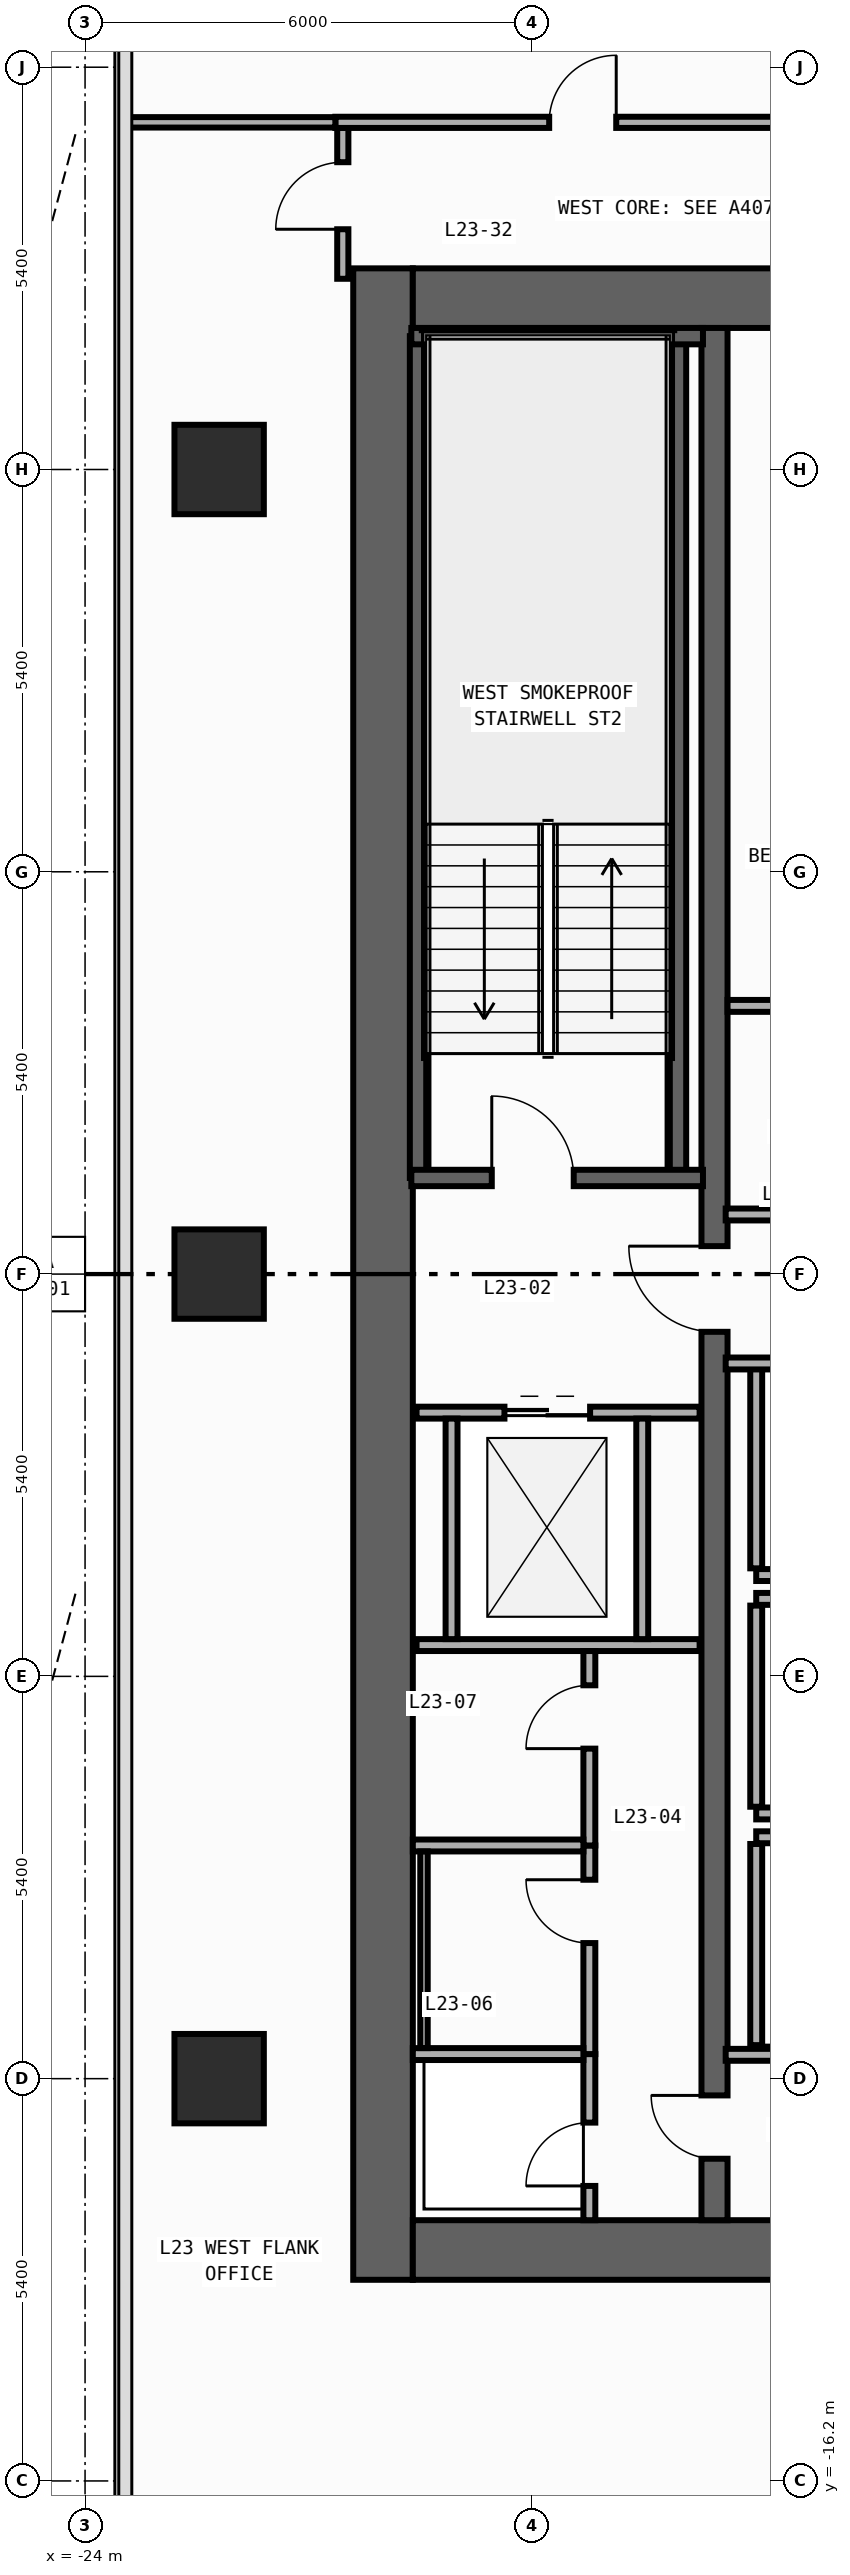
"""IFC4 building model, lengths in metres.
Left out: names, types, materials, properties, quantities, classifications, styles, units other than length and angle.
Written with IfcOpenShell. Run it as: python <this file> out.ifc"""

import sys

from ifc_helpers import new_model, si_unit, direction, frame, frame_2d, origin, origin_2d, place, context, subcontext, project, spatial, rectangle, extrude, element, fill, save


model = new_model("IFC4")
c1 = context("Model", 3, precision=1e-05, world=origin(), true_north=direction((0.0, 1.0)))
c2 = subcontext(c1, "Body", "Model", "MODEL_VIEW")
j1 = project(units=[si_unit("LENGTHUNIT", "METRE"), si_unit("PLANEANGLEUNIT", "RADIAN")], contexts=[c1])
p1 = place(None, origin())
s1 = spatial("IfcSite", under=j1, at=p1, CompositionType="ELEMENT")
p2 = place(p1, origin())
s2 = spatial("IfcBuilding", under=s1, at=p2, CompositionType="ELEMENT")
p3 = place(p2, frame((0.0, 0.0, 101.6)))
s3 = spatial("IfcBuildingStorey", under=s2, at=p3, CompositionType="ELEMENT", Elevation=101.6)
p4 = place(p3, frame((-20.0, -13.5, 0.0), z_axis=(0.0, 0.0, 1.0), x_axis=(0.0, 1.0, 0.0)))
e1 = element("IfcWall", 1, at=p4, inside=s3, PredefinedType="SHEAR", context=c2, shape_type="SweptSolid", body=[
    extrude(rectangle(XDim=27.0, YDim=0.8, at=frame_2d((13.5, 0.0))), origin(), (0.0, 0.0, 1.0), 3.94),
])
for number, where, z_axis, x_axis in (
    (2, (-19.6, -13.1, 0.0), (0.0, 0.0, 1.0), (1.0, 0.0, 0.0)),
    (3, (-19.6, 13.1, 0.0), (0.0, 0.0, 1.0), (1.0, 0.0, 0.0)),
):
    element("IfcWall", number, at=place(p3, frame(where, z_axis=z_axis, x_axis=x_axis)), inside=s3, PredefinedType="SHEAR", context=c2, shape_type="SweptSolid", body=[
        extrude(rectangle(XDim=6.8, YDim=0.8, at=frame_2d((3.4, 0.0))), origin(), (0.0, 0.0, 1.0), 3.94),
    ])
p5 = place(p3, frame((-15.55, -12.7, 0.0), z_axis=(0.0, 0.0, 1.0), x_axis=(0.0, 1.0, 0.0)))
e4 = element("IfcWall", 4, at=p5, inside=s3, PredefinedType="SHEAR", context=c2, shape_type="SweptSolid", body=[
    extrude(rectangle(XDim=25.4, YDim=0.35, at=frame_2d((12.7, 0.0))), origin(), (0.0, 0.0, 1.0), 3.94),
])
p6 = place(p5, frame((11.925, 0.0, 0.0)))
e5 = element("IfcOpeningElement", 5, at=p6, cuts=e4, PredefinedType="OPENING", context=c2, shape_type="SweptSolid", body=[
    extrude(rectangle(XDim=1.15, YDim=2.2, at=frame_2d((0.575, 1.1))), frame((0.0, 0.185, 0.0), z_axis=(0.0, -1.0, 0.0), x_axis=(1.0, 0.0, 0.0)), (0.0, 0.0, 1.0), 0.37),
])
p7 = place(p5, frame((0.825, 0.0, 0.0)))
e6 = element("IfcOpeningElement", 6, at=p7, cuts=e4, PredefinedType="OPENING", context=c2, shape_type="SweptSolid", body=[
    extrude(rectangle(XDim=0.85, YDim=2.1, at=frame_2d((0.425, 1.05))), frame((0.0, 0.185, 0.0), z_axis=(0.0, -1.0, 0.0), x_axis=(1.0, 0.0, 0.0)), (0.0, 0.0, 1.0), 0.37),
])
for number, where, z_axis, x_axis in (
    (7, (-16.04, 1.29, 0.0), (0.0, 0.0, 1.0), (0.0, 1.0, 0.0)),
    (8, (-19.53, 1.29, 0.0), (0.0, 0.0, 1.0), (0.0, 1.0, 0.0)),
):
    element("IfcWall", number, at=place(p3, frame(where, z_axis=z_axis, x_axis=x_axis)), inside=s3, PredefinedType="SHEAR", context=c2, shape_type="SweptSolid", body=[
        extrude(rectangle(XDim=11.3, YDim=0.22, at=frame_2d((5.65, 0.0))), origin(), (0.0, 0.0, 1.0), 3.94),
    ])
p8 = place(p3, frame((-19.62, 12.59, 0.0), z_axis=(0.0, 0.0, 1.0), x_axis=(1.0, 0.0, 0.0)))
e9 = element("IfcWall", 9, at=p8, inside=s3, PredefinedType="SHEAR", context=c2, shape_type="SweptSolid", body=[
    extrude(rectangle(XDim=3.915, YDim=0.22, at=frame_2d((1.958, 0.0))), origin(), (0.0, 0.0, 1.0), 3.94),
])
p9 = place(p3, frame((-19.62, 1.29, 0.0), z_axis=(0.0, 0.0, 1.0), x_axis=(1.0, 0.0, 0.0)))
e10 = element("IfcWall", 10, at=p9, inside=s3, PredefinedType="SHEAR", context=c2, shape_type="SweptSolid", body=[
    extrude(rectangle(XDim=3.915, YDim=0.22, at=frame_2d((1.958, 0.0))), origin(), (0.0, 0.0, 1.0), 3.94),
])
p10 = place(p9, frame((1.08, 0.0, 0.0)))
e11 = element("IfcOpeningElement", 11, at=p10, cuts=e10, PredefinedType="OPENING", context=c2, shape_type="SweptSolid", body=[
    extrude(rectangle(XDim=1.1, YDim=2.2, at=frame_2d((0.55, 1.1))), frame((0.0, 0.12, 0.0), z_axis=(0.0, -1.0, 0.0), x_axis=(1.0, 0.0, 0.0)), (0.0, 0.0, 1.0), 0.24),
])
for number, where, z_axis, x_axis in (
    (12, (-22.2, -10.8, 0.0), (0.0, 0.0, 1.0), (1.0, 0.0, 0.0)),
    (13, (-22.2, 0.0, 0.0), (0.0, 0.0, 1.0), (1.0, 0.0, 0.0)),
    (14, (-22.2, 10.8, 0.0), (0.0, 0.0, 1.0), (1.0, 0.0, 0.0)),
):
    element("IfcColumn", number, at=place(p3, frame(where, z_axis=z_axis, x_axis=x_axis)), inside=s3, PredefinedType="COLUMN", context=c2, shape_type="SweptSolid", body=[
        extrude(rectangle(XDim=1.2, YDim=1.2, at=origin_2d()), origin(), (0.0, 0.0, 1.0), 4.2),
    ])
p11 = place(p3, frame((-14.99, -4.04, 0.0), z_axis=(0.0, 0.0, 1.0), x_axis=(1.0, 0.0, 0.0)))
e15 = element("IfcWall", 15, at=p11, inside=s3, PredefinedType="STANDARD", context=c2, shape_type="SweptSolid", body=[
    extrude(rectangle(XDim=2.19, YDim=0.16, at=frame_2d((1.095, 0.0))), origin(), (0.0, 0.0, 1.0), 3.94),
])
p12 = place(p3, frame((-14.99, -3.95, 0.0), z_axis=(0.0, 0.0, 1.0), x_axis=(0.0, 1.0, 0.0)))
e16 = element("IfcWall", 16, at=p12, inside=s3, PredefinedType="STANDARD", context=c2, shape_type="SweptSolid", body=[
    extrude(rectangle(XDim=2.7, YDim=0.16, at=frame_2d((1.35, 0.0))), origin(), (0.0, 0.0, 1.0), 3.94),
])
for number, where, z_axis, x_axis in (
    (17, (-14.99, -7.24, 0.0), (0.0, 0.0, 1.0), (1.0, 0.0, 0.0)),
    (18, (-14.99, -4.36, 0.0), (0.0, 0.0, 1.0), (1.0, 0.0, 0.0)),
):
    element("IfcWall", number, at=place(p3, frame(where, z_axis=z_axis, x_axis=x_axis)), inside=s3, PredefinedType="STANDARD", context=c2, shape_type="SweptSolid", body=[
        extrude(rectangle(XDim=2.19, YDim=0.16, at=frame_2d((1.095, 0.0))), origin(), (0.0, 0.0, 1.0), 3.94),
    ])
p13 = place(p3, frame((-14.99, -7.15, 0.0), z_axis=(0.0, 0.0, 1.0), x_axis=(0.0, 1.0, 0.0)))
e19 = element("IfcWall", 19, at=p13, inside=s3, PredefinedType="STANDARD", context=c2, shape_type="SweptSolid", body=[
    extrude(rectangle(XDim=2.7, YDim=0.16, at=frame_2d((1.35, 0.0))), origin(), (0.0, 0.0, 1.0), 3.94),
])
p14 = place(p3, frame((-14.99, -7.56, 0.0), z_axis=(0.0, 0.0, 1.0), x_axis=(1.0, 0.0, 0.0)))
e20 = element("IfcWall", 20, at=p14, inside=s3, PredefinedType="STANDARD", context=c2, shape_type="SweptSolid", body=[
    extrude(rectangle(XDim=2.19, YDim=0.16, at=frame_2d((1.095, 0.0))), origin(), (0.0, 0.0, 1.0), 3.94),
])
p15 = place(p3, frame((-14.99, -10.35, 0.0), z_axis=(0.0, 0.0, 1.0), x_axis=(0.0, 1.0, 0.0)))
e21 = element("IfcWall", 21, at=p15, inside=s3, PredefinedType="STANDARD", context=c2, shape_type="SweptSolid", body=[
    extrude(rectangle(XDim=2.7, YDim=0.16, at=frame_2d((1.35, 0.0))), origin(), (0.0, 0.0, 1.0), 3.94),
])
p16 = place(p3, frame((-19.55, -1.86, 0.0), z_axis=(0.0, 0.0, 1.0), x_axis=(1.0, 0.0, 0.0)))
e22 = element("IfcWall", 22, at=p16, inside=s3, PredefinedType="STANDARD", context=c2, shape_type="SweptSolid", body=[
    extrude(rectangle(XDim=3.8, YDim=0.16, at=frame_2d((1.9, 0.0))), origin(), (0.0, 0.0, 1.0), 3.94),
])
p17 = place(p16, frame((1.18, 0.0, 0.0)))
e23 = element("IfcOpeningElement", 23, at=p17, cuts=e22, PredefinedType="OPENING", context=c2, shape_type="SweptSolid", body=[
    extrude(rectangle(XDim=1.15, YDim=2.2, at=frame_2d((0.575, 1.1))), frame((0.0, 0.09, 0.0), z_axis=(0.0, -1.0, 0.0), x_axis=(1.0, 0.0, 0.0)), (0.0, 0.0, 1.0), 0.18),
])
p18 = place(p3, frame((-19.55, -4.98, 0.0), z_axis=(0.0, 0.0, 1.0), x_axis=(1.0, 0.0, 0.0)))
e24 = element("IfcWall", 24, at=p18, inside=s3, PredefinedType="STANDARD", context=c2, shape_type="SweptSolid", body=[
    extrude(rectangle(XDim=3.8, YDim=0.16, at=frame_2d((1.9, 0.0))), origin(), (0.0, 0.0, 1.0), 3.94),
])
for number, where, z_axis, x_axis in (
    (25, (-19.08, -4.9, 0.0), (0.0, 0.0, 1.0), (0.0, 1.0, 0.0)),
    (26, (-16.52, -4.9, 0.0), (0.0, 0.0, 1.0), (0.0, 1.0, 0.0)),
):
    element("IfcWall", number, at=place(p3, frame(where, z_axis=z_axis, x_axis=x_axis)), inside=s3, PredefinedType="STANDARD", context=c2, shape_type="SweptSolid", body=[
        extrude(rectangle(XDim=2.96, YDim=0.16, at=frame_2d((1.48, 0.0))), origin(), (0.0, 0.0, 1.0), 3.94),
    ])
for number, where, z_axis, x_axis in (
    (27, (-15.4, 0.8, 0.0), (0.0, 0.0, 1.0), (1.0, 0.0, 0.0)),
    (28, (-15.4, -1.2, 0.0), (0.0, 0.0, 1.0), (1.0, 0.0, 0.0)),
    (29, (-15.4, -10.48, 0.0), (0.0, 0.0, 1.0), (1.0, 0.0, 0.0)),
):
    element("IfcWall", number, at=place(p3, frame(where, z_axis=z_axis, x_axis=x_axis)), inside=s3, PredefinedType="STANDARD", context=c2, shape_type="SweptSolid", body=[
        extrude(rectangle(XDim=2.6, YDim=0.16, at=frame_2d((1.3, 0.0))), origin(), (0.0, 0.0, 1.0), 3.94),
    ])
p19 = place(p3, frame((-17.23, -12.7, 0.0), z_axis=(0.0, 0.0, 1.0), x_axis=(0.0, 1.0, 0.0)))
e30 = element("IfcWall", 30, at=p19, inside=s3, PredefinedType="PARTITIONING", context=c2, shape_type="SweptSolid", body=[
    extrude(rectangle(XDim=2.23, YDim=0.16, at=frame_2d((1.115, 0.0))), origin(), (0.0, 0.0, 1.0), 3.94),
])
p20 = place(p19, frame((0.46, 0.0, 0.0)))
e31 = element("IfcOpeningElement", 31, at=p20, cuts=e30, PredefinedType="OPENING", context=c2, shape_type="SweptSolid", body=[
    extrude(rectangle(XDim=0.85, YDim=2.1, at=frame_2d((0.425, 1.05))), frame((0.0, 0.09, 0.0), z_axis=(0.0, -1.0, 0.0), x_axis=(1.0, 0.0, 0.0)), (0.0, 0.0, 1.0), 0.18),
])
p21 = place(p3, frame((-17.23, -10.47, 0.0), z_axis=(0.0, 0.0, 1.0), x_axis=(0.0, 1.0, 0.0)))
e32 = element("IfcWall", 32, at=p21, inside=s3, PredefinedType="PARTITIONING", context=c2, shape_type="SweptSolid", body=[
    extrude(rectangle(XDim=2.8, YDim=0.16, at=frame_2d((1.4, 0.0))), origin(), (0.0, 0.0, 1.0), 3.94),
])
p22 = place(p21, frame((1.49, 0.0, 0.0)))
e33 = element("IfcOpeningElement", 33, at=p22, cuts=e32, PredefinedType="OPENING", context=c2, shape_type="SweptSolid", body=[
    extrude(rectangle(XDim=0.85, YDim=2.1, at=frame_2d((0.425, 1.05))), frame((0.0, 0.09, 0.0), z_axis=(0.0, -1.0, 0.0), x_axis=(1.0, 0.0, 0.0)), (0.0, 0.0, 1.0), 0.18),
])
p23 = place(p3, frame((-17.23, -7.67, 0.0), z_axis=(0.0, 0.0, 1.0), x_axis=(0.0, 1.0, 0.0)))
e34 = element("IfcWall", 34, at=p23, inside=s3, PredefinedType="PARTITIONING", context=c2, shape_type="SweptSolid", body=[
    extrude(rectangle(XDim=2.61, YDim=0.16, at=frame_2d((1.305, 0.0))), origin(), (0.0, 0.0, 1.0), 3.94),
])
p24 = place(p23, frame((1.3, 0.0, 0.0)))
e35 = element("IfcOpeningElement", 35, at=p24, cuts=e34, PredefinedType="OPENING", context=c2, shape_type="SweptSolid", body=[
    extrude(rectangle(XDim=0.85, YDim=2.1, at=frame_2d((0.425, 1.05))), frame((0.0, 0.09, 0.0), z_axis=(0.0, -1.0, 0.0), x_axis=(1.0, 0.0, 0.0)), (0.0, 0.0, 1.0), 0.18),
])
for number, where, z_axis, x_axis in (
    (36, (-19.6, -10.47, 0.0), (0.0, 0.0, 1.0), (1.0, 0.0, 0.0)),
    (37, (-19.6, -7.67, 0.0), (0.0, 0.0, 1.0), (1.0, 0.0, 0.0)),
):
    element("IfcWall", number, at=place(p3, frame(where, z_axis=z_axis, x_axis=x_axis)), inside=s3, PredefinedType="PARTITIONING", context=c2, shape_type="SweptSolid", body=[
        extrude(rectangle(XDim=2.29, YDim=0.16, at=frame_2d((1.145, 0.0))), origin(), (0.0, 0.0, 1.0), 3.94),
    ])
p25 = place(p3, frame((-15.375, 3.6, 0.0), z_axis=(0.0, 0.0, 1.0), x_axis=(1.0, 0.0, 0.0)))
e38 = element("IfcWall", 38, at=p25, inside=s3, PredefinedType="PARTITIONING", context=c2, shape_type="SweptSolid", body=[
    extrude(rectangle(XDim=3.065, YDim=0.16, at=frame_2d((1.532, 0.0))), origin(), (0.0, 0.0, 1.0), 3.94),
])
p26 = place(p3, frame((-20.54, 13.36, 0.0), z_axis=(0.0, 0.0, 1.0), x_axis=(0.0, 1.0, 0.0)))
e39 = element("IfcWall", 39, at=p26, inside=s3, PredefinedType="PARTITIONING", context=c2, shape_type="SweptSolid", body=[
    extrude(rectangle(XDim=2.025, YDim=0.15, at=frame_2d((1.012, 0.0))), origin(), (0.0, 0.0, 1.0), 3.94),
])
p27 = place(p26, frame((0.665, 0.0, 0.0)))
e40 = element("IfcOpeningElement", 40, at=p27, cuts=e39, PredefinedType="OPENING", context=c2, shape_type="SweptSolid", body=[
    extrude(rectangle(XDim=0.9, YDim=2.15, at=frame_2d((0.45, 1.075))), frame((0.0, 0.085, 0.0), z_axis=(0.0, -1.0, 0.0), x_axis=(1.0, 0.0, 0.0)), (0.0, 0.0, 1.0), 0.17),
])
p28 = place(p3, frame((-20.64, 15.46, 0.0), z_axis=(0.0, 0.0, 1.0), x_axis=(1.0, 0.0, 0.0)))
e41 = element("IfcWall", 41, at=p28, inside=s3, PredefinedType="PARTITIONING", context=c2, shape_type="SweptSolid", body=[
    extrude(rectangle(XDim=8.65, YDim=0.15, at=frame_2d((4.325, 0.0))), origin(), (0.0, 0.0, 1.0), 3.94),
])
p29 = place(p28, frame((2.871, 0.0, 0.0)))
e42 = element("IfcOpeningElement", 42, at=p29, cuts=e41, PredefinedType="OPENING", context=c2, shape_type="SweptSolid", body=[
    extrude(rectangle(XDim=0.9, YDim=2.15, at=frame_2d((0.45, 1.075))), frame((0.0, 0.085, 0.0), z_axis=(0.0, -1.0, 0.0), x_axis=(1.0, 0.0, 0.0)), (0.0, 0.0, 1.0), 0.17),
])
p30 = place(p3, frame((-23.455, 15.46, 0.0), z_axis=(0.0, 0.0, 1.0), x_axis=(1.0, 0.0, 0.0)))
e43 = element("IfcWall", 43, at=p30, inside=s3, PredefinedType="PARTITIONING", context=c2, shape_type="SweptSolid", body=[
    extrude(rectangle(XDim=2.815, YDim=0.14, at=frame_2d((1.408, 0.0))), origin(), (0.0, 0.0, 1.0), 3.94),
])
p31 = place(p3, frame((-19.45, -10.39, 0.0), z_axis=(0.0, 0.0, 1.0), x_axis=(0.0, 1.0, 0.0)))
e44 = element("IfcWall", 44, at=p31, inside=s3, PredefinedType="PARTITIONING", context=c2, shape_type="SweptSolid", body=[
    extrude(rectangle(XDim=2.64, YDim=0.1, at=frame_2d((1.32, 0.0))), origin(), (0.0, 0.0, 1.0), 3.94),
])
p32 = place(p10, origin())
e45 = element("IfcDoor", 45, at=p32, inside=s3, OperationType="SINGLE_SWING_LEFT", PredefinedType="DOOR", context=c2, shape_type="SweptSolid", body=[
    extrude(rectangle(XDim=1.1, YDim=2.2, at=frame_2d((0.55, 1.1))), frame((0.0, 0.025, 0.0), z_axis=(0.0, -1.0, 0.0), x_axis=(1.0, 0.0, 0.0)), (0.0, 0.0, 1.0), 0.05),
])
fill(e11, e45)
p33 = place(p6, origin())
e46 = element("IfcDoor", 46, at=p33, inside=s3, OperationType="SINGLE_SWING_RIGHT", PredefinedType="DOOR", context=c2, shape_type="SweptSolid", body=[
    extrude(rectangle(XDim=1.15, YDim=2.2, at=frame_2d((0.575, 1.1))), frame((0.0, 0.025, 0.0), z_axis=(0.0, -1.0, 0.0), x_axis=(1.0, 0.0, 0.0)), (0.0, 0.0, 1.0), 0.05),
])
fill(e5, e46)
p34 = place(p7, origin())
e47 = element("IfcDoor", 47, at=p34, inside=s3, OperationType="SINGLE_SWING_RIGHT", PredefinedType="DOOR", context=c2, shape_type="SweptSolid", body=[
    extrude(rectangle(XDim=0.85, YDim=2.1, at=frame_2d((0.425, 1.05))), frame((0.0, 0.025, 0.0), z_axis=(0.0, -1.0, 0.0), x_axis=(1.0, 0.0, 0.0)), (0.0, 0.0, 1.0), 0.05),
])
fill(e6, e47)
p35 = place(p17, origin())
e48 = element("IfcDoor", 48, at=p35, inside=s3, OperationType="DOUBLE_DOOR_SLIDING", PredefinedType="DOOR", context=c2, shape_type="SweptSolid", body=[
    extrude(rectangle(XDim=1.15, YDim=2.2, at=frame_2d((0.575, 1.1))), frame((0.0, 0.025, 0.0), z_axis=(0.0, -1.0, 0.0), x_axis=(1.0, 0.0, 0.0)), (0.0, 0.0, 1.0), 0.05),
])
fill(e23, e48)
p36 = place(p20, origin())
e49 = element("IfcDoor", 49, at=p36, inside=s3, OperationType="SINGLE_SWING_LEFT", PredefinedType="DOOR", context=c2, shape_type="SweptSolid", body=[
    extrude(rectangle(XDim=0.85, YDim=2.1, at=frame_2d((0.425, 1.05))), frame((0.0, 0.025, 0.0), z_axis=(0.0, -1.0, 0.0), x_axis=(1.0, 0.0, 0.0)), (0.0, 0.0, 1.0), 0.05),
])
fill(e31, e49)
p37 = place(p22, origin())
e50 = element("IfcDoor", 50, at=p37, inside=s3, OperationType="SINGLE_SWING_RIGHT", PredefinedType="DOOR", context=c2, shape_type="SweptSolid", body=[
    extrude(rectangle(XDim=0.85, YDim=2.1, at=frame_2d((0.425, 1.05))), frame((0.0, 0.025, 0.0), z_axis=(0.0, -1.0, 0.0), x_axis=(1.0, 0.0, 0.0)), (0.0, 0.0, 1.0), 0.05),
])
fill(e33, e50)
p38 = place(p24, origin())
e51 = element("IfcDoor", 51, at=p38, inside=s3, OperationType="SINGLE_SWING_LEFT", PredefinedType="DOOR", context=c2, shape_type="SweptSolid", body=[
    extrude(rectangle(XDim=0.85, YDim=2.1, at=frame_2d((0.425, 1.05))), frame((0.0, 0.025, 0.0), z_axis=(0.0, -1.0, 0.0), x_axis=(1.0, 0.0, 0.0)), (0.0, 0.0, 1.0), 0.05),
])
fill(e35, e51)
p39 = place(p27, origin())
e52 = element("IfcDoor", 52, at=p39, inside=s3, OperationType="SINGLE_SWING_LEFT", PredefinedType="DOOR", context=c2, shape_type="SweptSolid", body=[
    extrude(rectangle(XDim=0.9, YDim=2.15, at=frame_2d((0.45, 1.075))), frame((0.0, 0.025, 0.0), z_axis=(0.0, -1.0, 0.0), x_axis=(1.0, 0.0, 0.0)), (0.0, 0.0, 1.0), 0.05),
])
fill(e40, e52)
p40 = place(p29, origin())
e53 = element("IfcDoor", 53, at=p40, inside=s3, OperationType="SINGLE_SWING_RIGHT", PredefinedType="DOOR", context=c2, shape_type="SweptSolid", body=[
    extrude(rectangle(XDim=0.9, YDim=2.15, at=frame_2d((0.45, 1.075))), frame((0.0, 0.025, 0.0), z_axis=(0.0, -1.0, 0.0), x_axis=(1.0, 0.0, 0.0)), (0.0, 0.0, 1.0), 0.05),
])
fill(e42, e53)
save(model, sys.argv[1])
